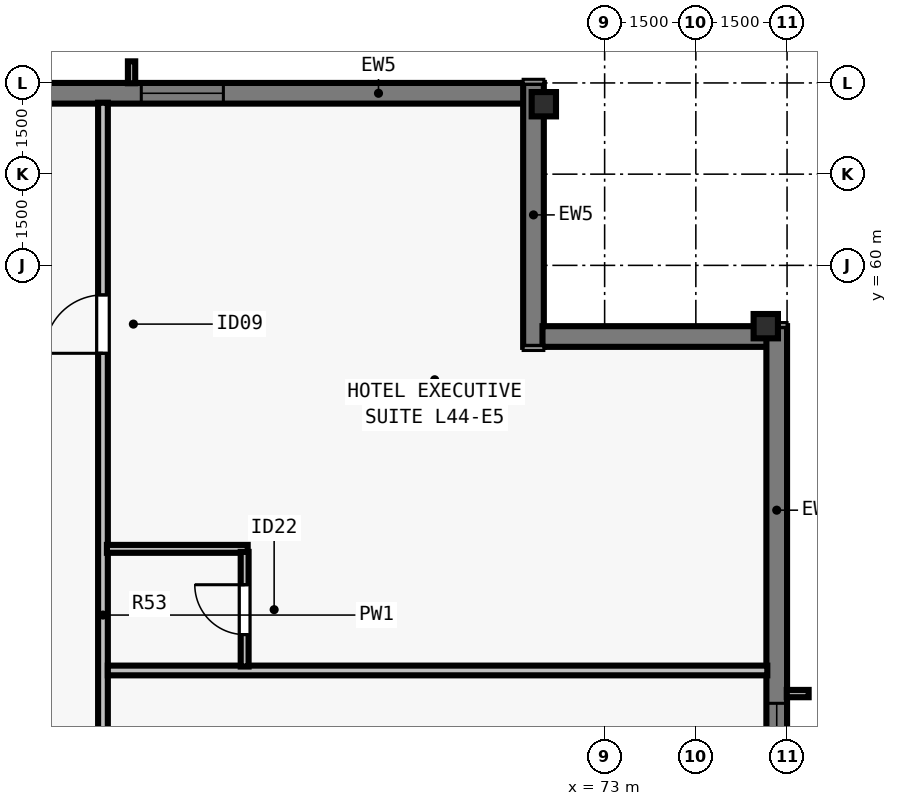
"""IFC4 building model, lengths in metres.
Left out: names, types, materials, properties, quantities, classifications, styles, units other than length and angle.
Written with IfcOpenShell. Run it as: python <this file> out.ifc"""

import sys

from ifc_helpers import new_model, si_unit, direction, frame, frame_2d, origin, origin_2d, place, context, subcontext, project, spatial, rectangle, i_section, extrude, element, fill, save


model = new_model("IFC4")
c1 = context("Model", 3, precision=1e-05, world=origin(), true_north=direction((0.0, 1.0)))
c2 = subcontext(c1, "Body", "Model", "MODEL_VIEW")
j1 = project(units=[si_unit("LENGTHUNIT", "METRE"), si_unit("PLANEANGLEUNIT", "RADIAN")], contexts=[c1])
p1 = place(None, origin())
s1 = spatial("IfcSite", under=j1, at=p1, CompositionType="ELEMENT")
p2 = place(p1, origin())
s2 = spatial("IfcBuilding", under=s1, at=p2, CompositionType="ELEMENT")
p3 = place(p2, frame((0.0, 0.0, 162.0)))
s3 = spatial("IfcBuildingStorey", under=s2, at=p3, CompositionType="ELEMENT", Elevation=162.0)
for number, where, z_axis, x_axis in (
    (1, (75.65, 59.0, 0.0), (0.0, 0.0, 1.0), (0.0, 1.0, 0.0)),
    (2, (72.0, 62.65, 0.0), (0.0, 0.0, 1.0), (1.0, 0.0, 0.0)),
):
    element("IfcColumn", number, at=place(p3, frame(where, z_axis=z_axis, x_axis=x_axis)), inside=s3, PredefinedType="COLUMN", context=c2, shape_type="SweptSolid", body=[
        extrude(i_section(OverallWidth=0.4, OverallDepth=0.4, WebThickness=0.022, FlangeThickness=0.036, at=origin_2d()), origin(), (0.0, 0.0, 1.0), 3.5),
    ])
p4 = place(p3, frame((32.0, 62.83, 0.0), z_axis=(0.0, 0.0, 1.0), x_axis=(1.0, 0.0, 0.0)))
e3 = element("IfcWall", 3, at=p4, inside=s3, PredefinedType="SOLIDWALL", context=c2, shape_type="SweptSolid", body=[
    extrude(rectangle(XDim=39.682, YDim=0.34, at=frame_2d((19.841, 0.0))), origin(), (0.0, 0.0, 1.0), 3.28),
])
p5 = place(p4, frame((4.502, 0.0, 0.8)))
e4 = element("IfcOpeningElement", 4, at=p5, cuts=e3, PredefinedType="OPENING", context=c2, shape_type="SweptSolid", body=[
    extrude(rectangle(XDim=1.35, YDim=1.66, at=frame_2d((0.675, 0.83))), frame((0.0, 0.18, 0.0), z_axis=(0.0, -1.0, 0.0), x_axis=(1.0, 0.0, 0.0)), (0.0, 0.0, 1.0), 0.36),
])
p6 = place(p4, frame((8.755, 0.0, 0.8)))
e5 = element("IfcOpeningElement", 5, at=p6, cuts=e3, PredefinedType="OPENING", context=c2, shape_type="SweptSolid", body=[
    extrude(rectangle(XDim=1.75, YDim=1.66, at=frame_2d((0.875, 0.83))), frame((0.0, 0.18, 0.0), z_axis=(0.0, -1.0, 0.0), x_axis=(1.0, 0.0, 0.0)), (0.0, 0.0, 1.0), 0.36),
])
p7 = place(p4, frame((12.059, 0.0, 0.8)))
e6 = element("IfcOpeningElement", 6, at=p7, cuts=e3, PredefinedType="OPENING", context=c2, shape_type="SweptSolid", body=[
    extrude(rectangle(XDim=1.35, YDim=1.66, at=frame_2d((0.675, 0.83))), frame((0.0, 0.18, 0.0), z_axis=(0.0, -1.0, 0.0), x_axis=(1.0, 0.0, 0.0)), (0.0, 0.0, 1.0), 0.36),
])
p8 = place(p4, frame((16.262, 0.0, 0.8)))
e7 = element("IfcOpeningElement", 7, at=p8, cuts=e3, PredefinedType="OPENING", context=c2, shape_type="SweptSolid", body=[
    extrude(rectangle(XDim=1.75, YDim=1.66, at=frame_2d((0.875, 0.83))), frame((0.0, 0.18, 0.0), z_axis=(0.0, -1.0, 0.0), x_axis=(1.0, 0.0, 0.0)), (0.0, 0.0, 1.0), 0.36),
])
p9 = place(p4, frame((19.166, 0.0, 0.8)))
e8 = element("IfcOpeningElement", 8, at=p9, cuts=e3, PredefinedType="OPENING", context=c2, shape_type="SweptSolid", body=[
    extrude(rectangle(XDim=1.35, YDim=1.66, at=frame_2d((0.675, 0.83))), frame((0.0, 0.18, 0.0), z_axis=(0.0, -1.0, 0.0), x_axis=(1.0, 0.0, 0.0)), (0.0, 0.0, 1.0), 0.36),
])
p10 = place(p4, frame((22.07, 0.0, 0.8)))
e9 = element("IfcOpeningElement", 9, at=p10, cuts=e3, PredefinedType="OPENING", context=c2, shape_type="SweptSolid", body=[
    extrude(rectangle(XDim=1.75, YDim=1.66, at=frame_2d((0.875, 0.83))), frame((0.0, 0.18, 0.0), z_axis=(0.0, -1.0, 0.0), x_axis=(1.0, 0.0, 0.0)), (0.0, 0.0, 1.0), 0.36),
])
p11 = place(p4, frame((26.273, 0.0, 0.8)))
e10 = element("IfcOpeningElement", 10, at=p11, cuts=e3, PredefinedType="OPENING", context=c2, shape_type="SweptSolid", body=[
    extrude(rectangle(XDim=1.35, YDim=1.66, at=frame_2d((0.675, 0.83))), frame((0.0, 0.18, 0.0), z_axis=(0.0, -1.0, 0.0), x_axis=(1.0, 0.0, 0.0)), (0.0, 0.0, 1.0), 0.36),
])
p12 = place(p4, frame((28.377, 0.0, 0.8)))
e11 = element("IfcOpeningElement", 11, at=p12, cuts=e3, PredefinedType="OPENING", context=c2, shape_type="SweptSolid", body=[
    extrude(rectangle(XDim=1.75, YDim=1.66, at=frame_2d((0.875, 0.83))), frame((0.0, 0.18, 0.0), z_axis=(0.0, -1.0, 0.0), x_axis=(1.0, 0.0, 0.0)), (0.0, 0.0, 1.0), 0.36),
])
p13 = place(p4, frame((33.38, 0.0, 0.8)))
e12 = element("IfcOpeningElement", 12, at=p13, cuts=e3, PredefinedType="OPENING", context=c2, shape_type="SweptSolid", body=[
    extrude(rectangle(XDim=1.35, YDim=1.66, at=frame_2d((0.675, 0.83))), frame((0.0, 0.18, 0.0), z_axis=(0.0, -1.0, 0.0), x_axis=(1.0, 0.0, 0.0)), (0.0, 0.0, 1.0), 0.36),
])
p14 = place(p3, frame((71.83, 63.0, 0.0), z_axis=(0.0, 0.0, 1.0), x_axis=(0.0, -1.0, 0.0)))
e13 = element("IfcWall", 13, at=p14, inside=s3, PredefinedType="SOLIDWALL", context=c2, shape_type="SweptSolid", body=[
    extrude(rectangle(XDim=4.34, YDim=0.34, at=frame_2d((2.17, 0.0))), origin(), (0.0, 0.0, 1.0), 3.28),
])
p15 = place(p3, frame((71.978, 58.83, 0.0), z_axis=(0.0, 0.0, 1.0), x_axis=(1.0, 0.0, 0.0)))
e14 = element("IfcWall", 14, at=p15, inside=s3, PredefinedType="SOLIDWALL", context=c2, shape_type="SweptSolid", body=[
    extrude(rectangle(XDim=3.704, YDim=0.34, at=frame_2d((1.852, 0.0))), origin(), (0.0, 0.0, 1.0), 3.28),
])
p16 = place(p3, frame((75.83, 59.0, 0.0), z_axis=(0.0, 0.0, 1.0), x_axis=(0.0, -1.0, 0.0)))
e15 = element("IfcWall", 15, at=p16, inside=s3, PredefinedType="SOLIDWALL", context=c2, shape_type="SweptSolid", body=[
    extrude(rectangle(XDim=39.682, YDim=0.34, at=frame_2d((19.841, 0.0))), origin(), (0.0, 0.0, 1.0), 3.28),
])
p17 = place(p16, frame((6.202, 0.0, 0.8)))
e16 = element("IfcOpeningElement", 16, at=p17, cuts=e15, PredefinedType="OPENING", context=c2, shape_type="SweptSolid", body=[
    extrude(rectangle(XDim=1.35, YDim=1.66, at=frame_2d((0.675, 0.83))), frame((0.0, 0.18, 0.0), z_axis=(0.0, -1.0, 0.0), x_axis=(1.0, 0.0, 0.0)), (0.0, 0.0, 1.0), 0.36),
])
p18 = place(p16, frame((8.305, 0.0, 0.8)))
e17 = element("IfcOpeningElement", 17, at=p18, cuts=e15, PredefinedType="OPENING", context=c2, shape_type="SweptSolid", body=[
    extrude(rectangle(XDim=1.75, YDim=1.66, at=frame_2d((0.875, 0.83))), frame((0.0, 0.18, 0.0), z_axis=(0.0, -1.0, 0.0), x_axis=(1.0, 0.0, 0.0)), (0.0, 0.0, 1.0), 0.36),
])
p19 = place(p16, frame((12.059, 0.0, 0.8)))
e18 = element("IfcOpeningElement", 18, at=p19, cuts=e15, PredefinedType="OPENING", context=c2, shape_type="SweptSolid", body=[
    extrude(rectangle(XDim=1.35, YDim=1.66, at=frame_2d((0.675, 0.83))), frame((0.0, 0.18, 0.0), z_axis=(0.0, -1.0, 0.0), x_axis=(1.0, 0.0, 0.0)), (0.0, 0.0, 1.0), 0.36),
])
p20 = place(p16, frame((16.262, 0.0, 0.8)))
e19 = element("IfcOpeningElement", 19, at=p20, cuts=e15, PredefinedType="OPENING", context=c2, shape_type="SweptSolid", body=[
    extrude(rectangle(XDim=1.75, YDim=1.66, at=frame_2d((0.875, 0.83))), frame((0.0, 0.18, 0.0), z_axis=(0.0, -1.0, 0.0), x_axis=(1.0, 0.0, 0.0)), (0.0, 0.0, 1.0), 0.36),
])
p21 = place(p16, frame((19.166, 0.0, 0.8)))
e20 = element("IfcOpeningElement", 20, at=p21, cuts=e15, PredefinedType="OPENING", context=c2, shape_type="SweptSolid", body=[
    extrude(rectangle(XDim=1.35, YDim=1.66, at=frame_2d((0.675, 0.83))), frame((0.0, 0.18, 0.0), z_axis=(0.0, -1.0, 0.0), x_axis=(1.0, 0.0, 0.0)), (0.0, 0.0, 1.0), 0.36),
])
p22 = place(p16, frame((22.07, 0.0, 0.8)))
e21 = element("IfcOpeningElement", 21, at=p22, cuts=e15, PredefinedType="OPENING", context=c2, shape_type="SweptSolid", body=[
    extrude(rectangle(XDim=1.75, YDim=1.66, at=frame_2d((0.875, 0.83))), frame((0.0, 0.18, 0.0), z_axis=(0.0, -1.0, 0.0), x_axis=(1.0, 0.0, 0.0)), (0.0, 0.0, 1.0), 0.36),
])
p23 = place(p16, frame((26.273, 0.0, 0.8)))
e22 = element("IfcOpeningElement", 22, at=p23, cuts=e15, PredefinedType="OPENING", context=c2, shape_type="SweptSolid", body=[
    extrude(rectangle(XDim=1.35, YDim=1.66, at=frame_2d((0.675, 0.83))), frame((0.0, 0.18, 0.0), z_axis=(0.0, -1.0, 0.0), x_axis=(1.0, 0.0, 0.0)), (0.0, 0.0, 1.0), 0.36),
])
p24 = place(p16, frame((29.627, 0.0, 0.8)))
e23 = element("IfcOpeningElement", 23, at=p24, cuts=e15, PredefinedType="OPENING", context=c2, shape_type="SweptSolid", body=[
    extrude(rectangle(XDim=1.75, YDim=1.66, at=frame_2d((0.875, 0.83))), frame((0.0, 0.18, 0.0), z_axis=(0.0, -1.0, 0.0), x_axis=(1.0, 0.0, 0.0)), (0.0, 0.0, 1.0), 0.36),
])
p25 = place(p16, frame((32.53, 0.0, 0.8)))
e24 = element("IfcOpeningElement", 24, at=p25, cuts=e15, PredefinedType="OPENING", context=c2, shape_type="SweptSolid", body=[
    extrude(rectangle(XDim=1.35, YDim=1.66, at=frame_2d((0.675, 0.83))), frame((0.0, 0.18, 0.0), z_axis=(0.0, -1.0, 0.0), x_axis=(1.0, 0.0, 0.0)), (0.0, 0.0, 1.0), 0.36),
])
p26 = place(p3, frame((64.75, 15.325, 0.0), z_axis=(0.0, 0.0, 1.0), x_axis=(0.0, 1.0, 0.0)))
e25 = element("IfcWall", 25, at=p26, inside=s3, PredefinedType="PARTITIONING", context=c2, shape_type="SweptSolid", body=[
    extrude(rectangle(XDim=47.35, YDim=0.16, at=frame_2d((23.675, 0.0))), origin(), (0.0, 0.0, 1.0), 2.555),
])
p27 = place(p26, frame((5.494, 0.0, 0.0)))
e26 = element("IfcOpeningElement", 26, at=p27, cuts=e25, PredefinedType="OPENING", context=c2, shape_type="SweptSolid", body=[
    extrude(rectangle(XDim=0.96, YDim=2.15, at=frame_2d((0.48, 1.075))), frame((0.0, 0.09, 0.0), z_axis=(0.0, -1.0, 0.0), x_axis=(1.0, 0.0, 0.0)), (0.0, 0.0, 1.0), 0.18),
])
p28 = place(p26, frame((14.796, 0.0, 0.0)))
e27 = element("IfcOpeningElement", 27, at=p28, cuts=e25, PredefinedType="OPENING", context=c2, shape_type="SweptSolid", body=[
    extrude(rectangle(XDim=0.96, YDim=2.15, at=frame_2d((0.48, 1.075))), frame((0.0, 0.09, 0.0), z_axis=(0.0, -1.0, 0.0), x_axis=(1.0, 0.0, 0.0)), (0.0, 0.0, 1.0), 0.18),
])
p29 = place(p26, frame((24.228, 0.0, 0.0)))
e28 = element("IfcOpeningElement", 28, at=p29, cuts=e25, PredefinedType="OPENING", context=c2, shape_type="SweptSolid", body=[
    extrude(rectangle(XDim=0.96, YDim=2.15, at=frame_2d((0.48, 1.075))), frame((0.0, 0.09, 0.0), z_axis=(0.0, -1.0, 0.0), x_axis=(1.0, 0.0, 0.0)), (0.0, 0.0, 1.0), 0.18),
])
p30 = place(p26, frame((33.66, 0.0, 0.0)))
e29 = element("IfcOpeningElement", 29, at=p30, cuts=e25, PredefinedType="OPENING", context=c2, shape_type="SweptSolid", body=[
    extrude(rectangle(XDim=0.96, YDim=2.15, at=frame_2d((0.48, 1.075))), frame((0.0, 0.09, 0.0), z_axis=(0.0, -1.0, 0.0), x_axis=(1.0, 0.0, 0.0)), (0.0, 0.0, 1.0), 0.18),
])
p31 = place(p26, frame((43.229, 0.0, 0.0)))
e30 = element("IfcOpeningElement", 30, at=p31, cuts=e25, PredefinedType="OPENING", context=c2, shape_type="SweptSolid", body=[
    extrude(rectangle(XDim=0.96, YDim=2.15, at=frame_2d((0.48, 1.075))), frame((0.0, 0.09, 0.0), z_axis=(0.0, -1.0, 0.0), x_axis=(1.0, 0.0, 0.0)), (0.0, 0.0, 1.0), 0.18),
])
p32 = place(p3, frame((64.83, 53.338, 0.0), z_axis=(0.0, 0.0, 1.0), x_axis=(1.0, 0.0, 0.0)))
e31 = element("IfcWall", 31, at=p32, inside=s3, PredefinedType="PARTITIONING", context=c2, shape_type="SweptSolid", body=[
    extrude(rectangle(XDim=10.845, YDim=0.16, at=frame_2d((5.422, 0.0))), origin(), (0.0, 0.0, 1.0), 2.896),
])
p33 = place(p3, frame((64.815, 55.338, 0.0), z_axis=(0.0, 0.0, 1.0), x_axis=(1.0, 0.0, 0.0)))
e32 = element("IfcWall", 32, at=p33, inside=s3, PredefinedType="PLUMBINGWALL", context=c2, shape_type="SweptSolid", body=[
    extrude(rectangle(XDim=2.315, YDim=0.13, at=frame_2d((1.157, 0.0))), origin(), (0.0, 0.0, 1.0), 3.28),
])
p34 = place(p3, frame((67.08, 53.403, 0.0), z_axis=(0.0, 0.0, 1.0), x_axis=(0.0, 1.0, 0.0)))
e33 = element("IfcWall", 33, at=p34, inside=s3, PredefinedType="PLUMBINGWALL", context=c2, shape_type="SweptSolid", body=[
    extrude(rectangle(XDim=1.885, YDim=0.13, at=frame_2d((0.942, 0.0))), origin(), (0.0, 0.0, 1.0), 3.28),
])
p35 = place(p34, frame((0.525, 0.0, 0.0)))
e34 = element("IfcOpeningElement", 34, at=p35, cuts=e33, PredefinedType="OPENING", context=c2, shape_type="SweptSolid", body=[
    extrude(rectangle(XDim=0.82, YDim=2.1, at=frame_2d((0.41, 1.05))), frame((0.0, 0.075, 0.0), z_axis=(0.0, -1.0, 0.0), x_axis=(1.0, 0.0, 0.0)), (0.0, 0.0, 1.0), 0.15),
])
p36 = place(p13, origin())
e35 = element("IfcWindow", 35, at=p36, inside=s3, PartitioningType="SINGLE_PANEL", PredefinedType="WINDOW", context=c2, shape_type="SweptSolid", body=[
    extrude(rectangle(XDim=1.35, YDim=1.66, at=frame_2d((0.675, 0.83))), frame((0.0, -0.05, 0.0), z_axis=(0.0, -1.0, 0.0), x_axis=(1.0, 0.0, 0.0)), (0.0, 0.0, 1.0), 0.06),
])
fill(e12, e35)
p37 = place(p17, origin())
e36 = element("IfcWindow", 36, at=p37, inside=s3, PartitioningType="SINGLE_PANEL", PredefinedType="WINDOW", context=c2, shape_type="SweptSolid", body=[
    extrude(rectangle(XDim=1.35, YDim=1.66, at=frame_2d((0.675, 0.83))), frame((0.0, -0.05, 0.0), z_axis=(0.0, -1.0, 0.0), x_axis=(1.0, 0.0, 0.0)), (0.0, 0.0, 1.0), 0.06),
])
fill(e16, e36)
p38 = place(p35, origin())
e37 = element("IfcDoor", 37, at=p38, inside=s3, OperationType="SINGLE_SWING_RIGHT", PredefinedType="DOOR", context=c2, shape_type="SweptSolid", body=[
    extrude(rectangle(XDim=0.82, YDim=2.1, at=frame_2d((0.41, 1.05))), frame((0.0, 0.025, 0.0), z_axis=(0.0, -1.0, 0.0), x_axis=(1.0, 0.0, 0.0)), (0.0, 0.0, 1.0), 0.05),
])
fill(e34, e37)
p39 = place(p31, origin())
e38 = element("IfcDoor", 38, at=p39, inside=s3, OperationType="SINGLE_SWING_LEFT", PredefinedType="DOOR", context=c2, shape_type="SweptSolid", body=[
    extrude(rectangle(XDim=0.96, YDim=2.15, at=frame_2d((0.48, 1.075))), frame((0.0, 0.025, 0.0), z_axis=(0.0, -1.0, 0.0), x_axis=(1.0, 0.0, 0.0)), (0.0, 0.0, 1.0), 0.05),
])
fill(e30, e38)
save(model, sys.argv[1])
